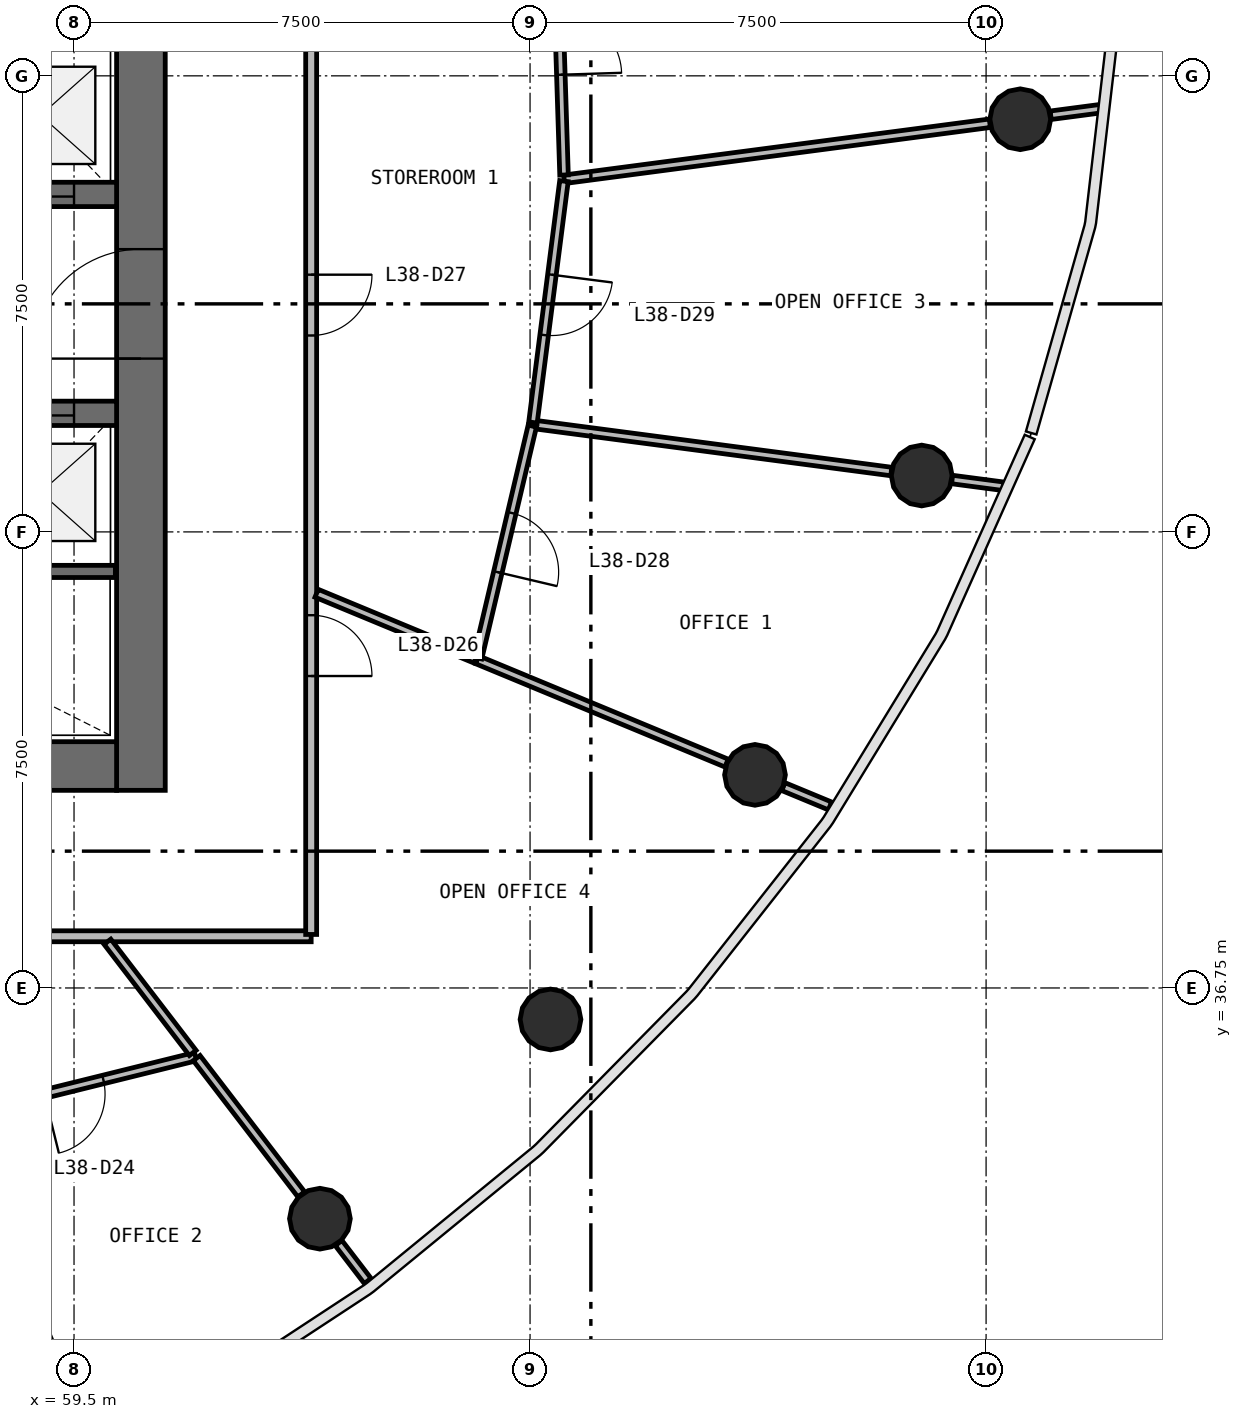
"""IFC4 building model, lengths in metres.
Left out: names, types, materials, properties, quantities, classifications, styles, units other than length and angle.
Written with IfcOpenShell. Run it as: python <this file> out.ifc"""

import sys

from ifc_helpers import new_model, si_unit, direction, frame, frame_2d, origin, origin_2d, place, context, subcontext, project, spatial, rectangle, circle, extrude, source, transform, mapped, element, fill, save


model = new_model("IFC4")
c1 = context("Model", 3, precision=1e-05, world=origin(), true_north=direction((0.0, 1.0)))
c2 = subcontext(c1, "Body", "Model", "MODEL_VIEW")
j1 = project(units=[si_unit("LENGTHUNIT", "METRE"), si_unit("PLANEANGLEUNIT", "RADIAN")], contexts=[c1])
p1 = place(None, origin())
s1 = spatial("IfcSite", under=j1, at=p1, CompositionType="ELEMENT")
p2 = place(p1, origin())
s2 = spatial("IfcBuilding", under=s1, at=p2, CompositionType="ELEMENT")
p3 = place(p2, frame((0.0, 0.0, 160.4)))
s3 = spatial("IfcBuildingStorey", under=s2, at=p3, CompositionType="ELEMENT", Elevation=160.4)
p4 = place(p3, frame((60.6, 40.0, 0.0), z_axis=(0.0, 0.0, 1.0), x_axis=(0.0, 1.0, 0.0)))
e1 = element("IfcWall", 1, at=p4, inside=s3, PredefinedType="SHEAR", context=c2, shape_type="SweptSolid", body=[
    extrude(rectangle(XDim=16.0, YDim=0.8, at=frame_2d((8.0, 0.0))), origin(), (0.0, 0.0, 1.0), 3.9),
])
p5 = place(p4, frame((7.1, 0.0, 0.0)))
e2 = element("IfcOpeningElement", 2, at=p5, cuts=e1, PredefinedType="OPENING", context=c2, shape_type="SweptSolid", body=[
    extrude(rectangle(XDim=1.8, YDim=2.1, at=frame_2d((0.9, 1.05))), frame((0.0, 0.41, 0.0), z_axis=(0.0, -1.0, 0.0), x_axis=(1.0, 0.0, 0.0)), (0.0, 0.0, 1.0), 0.82),
])
p6 = place(p3, frame((43.8, 40.4, 0.0), z_axis=(0.0, 0.0, 1.0), x_axis=(1.0, 0.0, 0.0)))
e3 = element("IfcWall", 3, at=p6, inside=s3, PredefinedType="SHEAR", context=c2, shape_type="SweptSolid", body=[
    extrude(rectangle(XDim=16.4, YDim=0.8, at=frame_2d((8.2, 0.0))), origin(), (0.0, 0.0, 1.0), 3.9),
])
p7 = place(p6, frame((10.1, 0.0, 0.0)))
e4 = element("IfcOpeningElement", 4, at=p7, cuts=e3, PredefinedType="OPENING", context=c2, shape_type="SweptSolid", body=[
    extrude(rectangle(XDim=1.2, YDim=2.1, at=frame_2d((0.6, 1.05))), frame((0.0, 0.41, 0.0), z_axis=(0.0, -1.0, 0.0), x_axis=(1.0, 0.0, 0.0)), (0.0, 0.0, 1.0), 0.82),
])
p8 = place(p6, frame((7.05, 0.0, 0.0)))
e5 = element("IfcOpeningElement", 5, at=p8, cuts=e3, PredefinedType="OPENING", context=c2, shape_type="SweptSolid", body=[
    extrude(rectangle(XDim=1.1, YDim=2.1, at=frame_2d((0.55, 1.05))), frame((0.0, 0.41, 0.0), z_axis=(0.0, -1.0, 0.0), x_axis=(1.0, 0.0, 0.0)), (0.0, 0.0, 1.0), 0.82),
])
p9 = place(p6, frame((0.5, 0.0, 0.0)))
e6 = element("IfcOpeningElement", 6, at=p9, cuts=e3, PredefinedType="OPENING", context=c2, shape_type="SweptSolid", body=[
    extrude(rectangle(XDim=0.8, YDim=2.1, at=frame_2d((0.4, 1.05))), frame((0.0, 0.41, 0.0), z_axis=(0.0, -1.0, 0.0), x_axis=(1.0, 0.0, 0.0)), (0.0, 0.0, 1.0), 0.82),
])
p10 = place(p3, frame((43.8, 49.8, 0.0), z_axis=(0.0, 0.0, 1.0), x_axis=(1.0, 0.0, 0.0)))
e7 = element("IfcWall", 7, at=p10, inside=s3, PredefinedType="SHEAR", context=c2, shape_type="SweptSolid", body=[
    extrude(rectangle(XDim=16.4, YDim=0.4, at=frame_2d((8.2, 0.0))), origin(), (0.0, 0.0, 1.0), 3.9),
])
p11 = place(p10, frame((9.6, 0.0, 0.0)))
e8 = element("IfcOpeningElement", 8, at=p11, cuts=e7, PredefinedType="OPENING", context=c2, shape_type="SweptSolid", body=[
    extrude(rectangle(XDim=1.1, YDim=2.1, at=frame_2d((0.55, 1.05))), frame((0.0, 0.21, 0.0), z_axis=(0.0, -1.0, 0.0), x_axis=(1.0, 0.0, 0.0)), (0.0, 0.0, 1.0), 0.42),
])
p12 = place(p10, frame((12.1, 0.0, 0.0)))
e9 = element("IfcOpeningElement", 9, at=p12, cuts=e7, PredefinedType="OPENING", context=c2, shape_type="SweptSolid", body=[
    extrude(rectangle(XDim=1.1, YDim=2.1, at=frame_2d((0.55, 1.05))), frame((0.0, 0.21, 0.0), z_axis=(0.0, -1.0, 0.0), x_axis=(1.0, 0.0, 0.0)), (0.0, 0.0, 1.0), 0.42),
])
p13 = place(p10, frame((14.6, 0.0, 0.0)))
e10 = element("IfcOpeningElement", 10, at=p13, cuts=e7, PredefinedType="OPENING", context=c2, shape_type="SweptSolid", body=[
    extrude(rectangle(XDim=1.1, YDim=2.1, at=frame_2d((0.55, 1.05))), frame((0.0, 0.21, 0.0), z_axis=(0.0, -1.0, 0.0), x_axis=(1.0, 0.0, 0.0)), (0.0, 0.0, 1.0), 0.42),
])
p14 = place(p10, frame((3.45, 0.0, 0.0)))
e11 = element("IfcOpeningElement", 11, at=p14, cuts=e7, PredefinedType="OPENING", context=c2, shape_type="SweptSolid", body=[
    extrude(rectangle(XDim=0.9, YDim=2.1, at=frame_2d((0.45, 1.05))), frame((0.0, 0.21, 0.0), z_axis=(0.0, -1.0, 0.0), x_axis=(1.0, 0.0, 0.0)), (0.0, 0.0, 1.0), 0.42),
])
p15 = place(p10, frame((7.65, 0.0, 0.0)))
e12 = element("IfcOpeningElement", 12, at=p15, cuts=e7, PredefinedType="OPENING", context=c2, shape_type="SweptSolid", body=[
    extrude(rectangle(XDim=0.9, YDim=2.1, at=frame_2d((0.45, 1.05))), frame((0.0, 0.21, 0.0), z_axis=(0.0, -1.0, 0.0), x_axis=(1.0, 0.0, 0.0)), (0.0, 0.0, 1.0), 0.42),
])
p16 = place(p3, frame((43.8, 46.2, 0.0), z_axis=(0.0, 0.0, 1.0), x_axis=(1.0, 0.0, 0.0)))
e13 = element("IfcWall", 13, at=p16, inside=s3, PredefinedType="SHEAR", context=c2, shape_type="SweptSolid", body=[
    extrude(rectangle(XDim=16.4, YDim=0.4, at=frame_2d((8.2, 0.0))), origin(), (0.0, 0.0, 1.0), 3.9),
])
p17 = place(p16, frame((9.6, 0.0, 0.0)))
e14 = element("IfcOpeningElement", 14, at=p17, cuts=e13, PredefinedType="OPENING", context=c2, shape_type="SweptSolid", body=[
    extrude(rectangle(XDim=1.1, YDim=2.1, at=frame_2d((0.55, 1.05))), frame((0.0, 0.21, 0.0), z_axis=(0.0, -1.0, 0.0), x_axis=(1.0, 0.0, 0.0)), (0.0, 0.0, 1.0), 0.42),
])
p18 = place(p16, frame((12.1, 0.0, 0.0)))
e15 = element("IfcOpeningElement", 15, at=p18, cuts=e13, PredefinedType="OPENING", context=c2, shape_type="SweptSolid", body=[
    extrude(rectangle(XDim=1.1, YDim=2.1, at=frame_2d((0.55, 1.05))), frame((0.0, 0.21, 0.0), z_axis=(0.0, -1.0, 0.0), x_axis=(1.0, 0.0, 0.0)), (0.0, 0.0, 1.0), 0.42),
])
p19 = place(p16, frame((14.6, 0.0, 0.0)))
e16 = element("IfcOpeningElement", 16, at=p19, cuts=e13, PredefinedType="OPENING", context=c2, shape_type="SweptSolid", body=[
    extrude(rectangle(XDim=1.1, YDim=2.1, at=frame_2d((0.55, 1.05))), frame((0.0, 0.21, 0.0), z_axis=(0.0, -1.0, 0.0), x_axis=(1.0, 0.0, 0.0)), (0.0, 0.0, 1.0), 0.42),
])
p20 = place(p16, frame((2.45, 0.0, 0.0)))
e17 = element("IfcOpeningElement", 17, at=p20, cuts=e13, PredefinedType="OPENING", context=c2, shape_type="SweptSolid", body=[
    extrude(rectangle(XDim=0.9, YDim=2.1, at=frame_2d((0.45, 1.05))), frame((0.0, 0.21, 0.0), z_axis=(0.0, -1.0, 0.0), x_axis=(1.0, 0.0, 0.0)), (0.0, 0.0, 1.0), 0.42),
])
p21 = place(p16, frame((7.65, 0.0, 0.0)))
e18 = element("IfcOpeningElement", 18, at=p21, cuts=e13, PredefinedType="OPENING", context=c2, shape_type="SweptSolid", body=[
    extrude(rectangle(XDim=0.9, YDim=2.1, at=frame_2d((0.45, 1.05))), frame((0.0, 0.21, 0.0), z_axis=(0.0, -1.0, 0.0), x_axis=(1.0, 0.0, 0.0)), (0.0, 0.0, 1.0), 0.42),
])
m1 = source(origin(), c2, "Body", "SweptSolid", [
    extrude(circle(Radius=0.5, at=origin_2d()), origin(), (0.0, 0.0, 1.0), 3.9),
])
for number, where, z_axis, x_axis in (
    (19, (75.062, 51.036, 0.0), (0.0, 0.0, 1.0), (1.0, 0.0, 0.0)),
    (20, (63.544, 32.956, 0.0), (0.0, 0.0, 1.0), (1.0, 0.0, 0.0)),
    (21, (67.336, 36.232, 0.0), (0.0, 0.0, 1.0), (1.0, 0.0, 0.0)),
    (22, (70.699, 40.254, 0.0), (0.0, 0.0, 1.0), (1.0, 0.0, 0.0)),
    (23, (73.441, 45.177, 0.0), (0.0, 0.0, 1.0), (1.0, 0.0, 0.0)),
):
    element("IfcColumn", number, at=place(p3, frame(where, z_axis=z_axis, x_axis=x_axis)), inside=s3, PredefinedType="COLUMN", context=c2, shape_type="MappedRepresentation", body=[
        mapped(m1, transform((0.0, 0.0, 0.0), scale=1.0)),
    ])
p22 = place(p3, frame((57.73, 43.6, 0.0), z_axis=(0.0, 0.0, 1.0), x_axis=(1.0, 0.0, 0.0)))
e24 = element("IfcWall", 24, at=p22, inside=s3, PredefinedType="SOLIDWALL", context=c2, shape_type="SweptSolid", body=[
    extrude(rectangle(XDim=2.45, YDim=0.2, at=frame_2d((1.225, 0.0))), origin(), (0.0, 0.0, 1.0), 3.58),
])
p23 = place(p3, frame((63.4, 37.6, 0.0), z_axis=(0.0, 0.0, 1.0), x_axis=(-1.0, 0.0, 0.0)))
e25 = element("IfcWall", 25, at=p23, inside=s3, PredefinedType="PARTITIONING", context=c2, shape_type="SweptSolid", body=[
    extrude(rectangle(XDim=22.8, YDim=0.18, at=frame_2d((11.4, 0.0))), origin(), (0.0, 0.0, 1.0), 2.88),
])
p24 = place(p23, frame((16.05, 0.0, 0.0)))
e26 = element("IfcOpeningElement", 26, at=p24, cuts=e25, PredefinedType="OPENING", context=c2, shape_type="SweptSolid", body=[
    extrude(rectangle(XDim=0.9, YDim=2.1, at=frame_2d((0.45, 1.05))), frame((0.0, 0.1, 0.0), z_axis=(0.0, -1.0, 0.0), x_axis=(1.0, 0.0, 0.0)), (0.0, 0.0, 1.0), 0.2),
])
p25 = place(p23, frame((13.05, 0.0, 0.0)))
e27 = element("IfcOpeningElement", 27, at=p25, cuts=e25, PredefinedType="OPENING", context=c2, shape_type="SweptSolid", body=[
    extrude(rectangle(XDim=0.9, YDim=2.1, at=frame_2d((0.45, 1.05))), frame((0.0, 0.1, 0.0), z_axis=(0.0, -1.0, 0.0), x_axis=(1.0, 0.0, 0.0)), (0.0, 0.0, 1.0), 0.2),
])
p26 = place(p23, frame((10.95, 0.0, 0.0)))
e28 = element("IfcOpeningElement", 28, at=p26, cuts=e25, PredefinedType="OPENING", context=c2, shape_type="SweptSolid", body=[
    extrude(rectangle(XDim=1.0, YDim=2.1, at=frame_2d((0.5, 1.05))), frame((0.0, 0.1, 0.0), z_axis=(0.0, -1.0, 0.0), x_axis=(1.0, 0.0, 0.0)), (0.0, 0.0, 1.0), 0.2),
])
p27 = place(p23, frame((19.95, 0.0, 0.0)))
e29 = element("IfcOpeningElement", 29, at=p27, cuts=e25, PredefinedType="OPENING", context=c2, shape_type="SweptSolid", body=[
    extrude(rectangle(XDim=1.0, YDim=2.1, at=frame_2d((0.5, 1.05))), frame((0.0, 0.1, 0.0), z_axis=(0.0, -1.0, 0.0), x_axis=(1.0, 0.0, 0.0)), (0.0, 0.0, 1.0), 0.2),
])
p28 = place(p3, frame((63.4, 58.37, 0.0), z_axis=(0.0, 0.0, 1.0), x_axis=(0.0, -1.0, 0.0)))
e30 = element("IfcWall", 30, at=p28, inside=s3, PredefinedType="PARTITIONING", context=c2, shape_type="SweptSolid", body=[
    extrude(rectangle(XDim=20.74, YDim=0.18, at=frame_2d((10.37, 0.0))), origin(), (0.0, 0.0, 1.0), 2.88),
])
p29 = place(p28, frame((15.49, 0.0, 0.0)))
e31 = element("IfcOpeningElement", 31, at=p29, cuts=e30, PredefinedType="OPENING", context=c2, shape_type="SweptSolid", body=[
    extrude(rectangle(XDim=1.0, YDim=2.1, at=frame_2d((0.5, 1.05))), frame((0.0, 0.1, 0.0), z_axis=(0.0, -1.0, 0.0), x_axis=(1.0, 0.0, 0.0)), (0.0, 0.0, 1.0), 0.2),
])
p30 = place(p28, frame((9.89, 0.0, 0.0)))
e32 = element("IfcOpeningElement", 32, at=p30, cuts=e30, PredefinedType="OPENING", context=c2, shape_type="SweptSolid", body=[
    extrude(rectangle(XDim=1.0, YDim=2.1, at=frame_2d((0.5, 1.05))), frame((0.0, 0.1, 0.0), z_axis=(0.0, -1.0, 0.0), x_axis=(1.0, 0.0, 0.0)), (0.0, 0.0, 1.0), 0.2),
])
p31 = place(p3, frame((67.561, 50.049, 0.0), z_axis=(0.0, 0.0, 1.0), x_axis=(0.991446056041, 0.130517117504, 0.0)))
e33 = element("IfcWall", 33, at=p31, inside=s3, PredefinedType="PARTITIONING", context=c2, shape_type="SweptSolid", body=[
    extrude(rectangle(XDim=7.061, YDim=0.14, at=frame_2d((3.531, 0.0))), origin(), (0.0, 0.0, 1.0), 2.88),
])
p32 = place(p3, frame((67.044, 46.019, 0.0), z_axis=(0.0, 0.0, 1.0), x_axis=(0.991450523091, -0.13048318, 0.0)))
e34 = element("IfcWall", 34, at=p32, inside=s3, PredefinedType="PARTITIONING", context=c2, shape_type="SweptSolid", body=[
    extrude(rectangle(XDim=5.948, YDim=0.14, at=frame_2d((2.974, 0.0))), origin(), (0.0, 0.0, 1.0), 2.88),
])
p33 = place(p3, frame((66.131, 42.147, 0.0), z_axis=(0.0, 0.0, 1.0), x_axis=(0.923872072557, -0.382701441792, 0.0)))
e35 = element("IfcWall", 35, at=p33, inside=s3, PredefinedType="PARTITIONING", context=c2, shape_type="SweptSolid", body=[
    extrude(rectangle(XDim=4.44, YDim=0.14, at=frame_2d((2.22, 0.0))), origin(), (0.0, 0.0, 1.0), 2.88),
])
p34 = place(p3, frame((67.424, 54.358, 0.0), z_axis=(0.0, 0.0, 1.0), x_axis=(0.031887030208, -0.999491479356, 0.0)))
e36 = element("IfcWall", 36, at=p34, inside=s3, PredefinedType="PARTITIONING", context=c2, shape_type="SweptSolid", body=[
    extrude(rectangle(XDim=4.242, YDim=0.14, at=frame_2d((2.121, 0.0))), origin(), (0.0, 0.0, 1.0), 2.88),
])
p35 = place(p34, frame((1.592, 0.0, 0.0)))
e37 = element("IfcOpeningElement", 37, at=p35, cuts=e36, PredefinedType="OPENING", context=c2, shape_type="SweptSolid", body=[
    extrude(rectangle(XDim=1.0, YDim=2.1, at=frame_2d((0.5, 1.05))), frame((0.0, 0.08, 0.0), z_axis=(0.0, -1.0, 0.0), x_axis=(1.0, 0.0, 0.0)), (0.0, 0.0, 1.0), 0.16),
])
p36 = place(p3, frame((57.534, 34.639, 0.0), z_axis=(0.0, 0.0, 1.0), x_axis=(0.382696163026, -0.923874259196, 0.0)))
e38 = element("IfcWall", 38, at=p36, inside=s3, PredefinedType="PARTITIONING", context=c2, shape_type="SweptSolid", body=[
    extrude(rectangle(XDim=4.112, YDim=0.14, at=frame_2d((2.056, 0.0))), origin(), (0.0, 0.0, 1.0), 2.88),
])
p37 = place(p3, frame((61.499, 35.621, 0.0), z_axis=(0.0, 0.0, 1.0), x_axis=(-0.970705214058, -0.240273567836, 0.0)))
e39 = element("IfcWall", 39, at=p37, inside=s3, PredefinedType="PARTITIONING", context=c2, shape_type="SweptSolid", body=[
    extrude(rectangle(XDim=4.014, YDim=0.14, at=frame_2d((2.007, 0.0))), origin(), (0.0, 0.0, 1.0), 2.88),
])
p38 = place(p37, frame((1.563, 0.0, 0.0)))
e40 = element("IfcOpeningElement", 40, at=p38, cuts=e39, PredefinedType="OPENING", context=c2, shape_type="SweptSolid", body=[
    extrude(rectangle(XDim=1.0, YDim=2.1, at=frame_2d((0.5, 1.05))), frame((0.0, 0.08, 0.0), z_axis=(0.0, -1.0, 0.0), x_axis=(1.0, 0.0, 0.0)), (0.0, 0.0, 1.0), 0.16),
])
p39 = place(p3, frame((67.557, 50.019, 0.0), z_axis=(0.0, 0.0, 1.0), x_axis=(-0.127375141881, -0.99185461295, 0.0)))
e41 = element("IfcWall", 41, at=p39, inside=s3, PredefinedType="PARTITIONING", context=c2, shape_type="SweptSolid", body=[
    extrude(rectangle(XDim=4.002, YDim=0.14, at=frame_2d((2.001, 0.0))), origin(), (0.0, 0.0, 1.0), 2.88),
])
p40 = place(p39, frame((1.552, 0.0, 0.0)))
e42 = element("IfcOpeningElement", 42, at=p40, cuts=e41, PredefinedType="OPENING", context=c2, shape_type="SweptSolid", body=[
    extrude(rectangle(XDim=1.0, YDim=2.1, at=frame_2d((0.5, 1.05))), frame((0.0, 0.08, 0.0), z_axis=(0.0, -1.0, 0.0), x_axis=(1.0, 0.0, 0.0)), (0.0, 0.0, 1.0), 0.16),
])
p41 = place(p3, frame((67.037, 45.99, 0.0), z_axis=(0.0, 0.0, 1.0), x_axis=(-0.229452538662, -0.973319851077, 0.0)))
e43 = element("IfcWall", 43, at=p41, inside=s3, PredefinedType="PARTITIONING", context=c2, shape_type="SweptSolid", body=[
    extrude(rectangle(XDim=3.919, YDim=0.14, at=frame_2d((1.959, 0.0))), origin(), (0.0, 0.0, 1.0), 2.88),
])
p42 = place(p41, frame((1.469, 0.0, 0.0)))
e44 = element("IfcOpeningElement", 44, at=p42, cuts=e43, PredefinedType="OPENING", context=c2, shape_type="SweptSolid", body=[
    extrude(rectangle(XDim=1.0, YDim=2.1, at=frame_2d((0.5, 1.05))), frame((0.0, 0.08, 0.0), z_axis=(0.0, -1.0, 0.0), x_axis=(1.0, 0.0, 0.0)), (0.0, 0.0, 1.0), 0.16),
])
p43 = place(p3, frame((63.49, 43.241, 0.0), z_axis=(0.0, 0.0, 1.0), x_axis=(0.923859015747, -0.382732960462, 0.0)))
e45 = element("IfcWall", 45, at=p43, inside=s3, PredefinedType="PARTITIONING", context=c2, shape_type="SweptSolid", body=[
    extrude(rectangle(XDim=2.828, YDim=0.14, at=frame_2d((1.414, 0.0))), origin(), (0.0, 0.0, 1.0), 2.88),
])
p44 = place(p3, frame((61.517, 35.597, 0.0), z_axis=(0.0, 0.0, 1.0), x_axis=(0.608716333524, -0.793387941238, 0.0)))
e46 = element("IfcWall", 46, at=p44, inside=s3, PredefinedType="PARTITIONING", context=c2, shape_type="SweptSolid", body=[
    extrude(rectangle(XDim=2.825, YDim=0.14, at=frame_2d((1.413, 0.0))), origin(), (0.0, 0.0, 1.0), 2.88),
])
p45 = place(p3, frame((60.049, 37.51, 0.0), z_axis=(0.0, 0.0, 1.0), x_axis=(0.608742818772, -0.793367620081, 0.0)))
e47 = element("IfcWall", 47, at=p45, inside=s3, PredefinedType="PARTITIONING", context=c2, shape_type="SweptSolid", body=[
    extrude(rectangle(XDim=2.305, YDim=0.14, at=frame_2d((1.152, 0.0))), origin(), (0.0, 0.0, 1.0), 2.88),
])
p46 = place(p3, frame((73.941, 45.111, 0.0), z_axis=(0.0, 0.0, 1.0), x_axis=(0.991446500326, -0.130513742537, 0.0)))
e48 = element("IfcWall", 48, at=p46, inside=s3, PredefinedType="PARTITIONING", context=c2, shape_type="SweptSolid", body=[
    extrude(rectangle(XDim=0.853, YDim=0.14, at=frame_2d((0.427, 0.0))), origin(), (0.0, 0.0, 1.0), 2.88),
])
p47 = place(p3, frame((75.562, 51.102, 0.0), z_axis=(0.0, 0.0, 1.0), x_axis=(0.991432738393, 0.130618242377, 0.0)))
e49 = element("IfcWall", 49, at=p47, inside=s3, PredefinedType="PARTITIONING", context=c2, shape_type="SweptSolid", body=[
    extrude(rectangle(XDim=0.849, YDim=0.14, at=frame_2d((0.424, 0.0))), origin(), (0.0, 0.0, 1.0), 2.88),
])
p48 = place(p3, frame((71.166, 40.061, 0.0), z_axis=(0.0, 0.0, 1.0), x_axis=(0.923909393783, -0.382611332921, 0.0)))
e50 = element("IfcWall", 50, at=p48, inside=s3, PredefinedType="PARTITIONING", context=c2, shape_type="SweptSolid", body=[
    extrude(rectangle(XDim=0.831, YDim=0.14, at=frame_2d((0.416, 0.0))), origin(), (0.0, 0.0, 1.0), 2.88),
])
p49 = place(p3, frame((63.851, 32.555, 0.0), z_axis=(0.0, 0.0, 1.0), x_axis=(0.608659697441, -0.793431391307, 0.0)))
e51 = element("IfcWall", 51, at=p49, inside=s3, PredefinedType="PARTITIONING", context=c2, shape_type="SweptSolid", body=[
    extrude(rectangle(XDim=0.786, YDim=0.14, at=frame_2d((0.393, 0.0))), origin(), (0.0, 0.0, 1.0), 2.88),
])
m2 = source(origin(), c2, "Body", "SweptSolid", [
    extrude(rectangle(XDim=1.8, YDim=2.1, at=frame_2d((0.9, 1.05))), frame((0.0, 0.025, 0.0), z_axis=(0.0, -1.0, 0.0), x_axis=(1.0, 0.0, 0.0)), (0.0, 0.0, 1.0), 0.05),
])
p50 = place(p5, origin())
e52 = element("IfcDoor", 52, at=p50, inside=s3, OperationType="SINGLE_SWING_LEFT", PredefinedType="DOOR", context=c2, shape_type="MappedRepresentation", body=[
    mapped(m2, transform((0.0, 0.0, 0.0), scale=1.0)),
])
fill(e2, e52)
m3 = source(origin(), c2, "Body", "SweptSolid", [
    extrude(rectangle(XDim=1.1, YDim=2.1, at=frame_2d((0.55, 1.05))), frame((0.0, 0.025, 0.0), z_axis=(0.0, -1.0, 0.0), x_axis=(1.0, 0.0, 0.0)), (0.0, 0.0, 1.0), 0.05),
])
p51 = place(p13, origin())
e53 = element("IfcDoor", 53, at=p51, inside=s3, OperationType="DOUBLE_DOOR_SLIDING", PredefinedType="USERDEFINED", context=c2, shape_type="MappedRepresentation", body=[
    mapped(m3, transform((0.0, 0.0, 0.0), scale=1.0)),
])
fill(e10, e53)
p52 = place(p19, origin())
e54 = element("IfcDoor", 54, at=p52, inside=s3, OperationType="DOUBLE_DOOR_SLIDING", PredefinedType="USERDEFINED", context=c2, shape_type="MappedRepresentation", body=[
    mapped(m3, transform((0.0, 0.0, 0.0), scale=1.0)),
])
fill(e16, e54)
m4 = source(origin(), c2, "Body", "SweptSolid", [
    extrude(rectangle(XDim=1.0, YDim=2.1, at=frame_2d((0.5, 1.05))), frame((0.0, 0.025, 0.0), z_axis=(0.0, -1.0, 0.0), x_axis=(1.0, 0.0, 0.0)), (0.0, 0.0, 1.0), 0.05),
])
p53 = place(p38, origin())
e55 = element("IfcDoor", 55, at=p53, inside=s3, OperationType="SINGLE_SWING_RIGHT", PredefinedType="DOOR", context=c2, shape_type="MappedRepresentation", body=[
    mapped(m4, transform((0.0, 0.0, 0.0), scale=1.0)),
])
fill(e40, e55)
p54 = place(p29, origin())
e56 = element("IfcDoor", 56, at=p54, inside=s3, OperationType="SINGLE_SWING_RIGHT", PredefinedType="DOOR", context=c2, shape_type="MappedRepresentation", body=[
    mapped(m4, transform((0.0, 0.0, 0.0), scale=1.0)),
])
fill(e31, e56)
p55 = place(p30, origin())
e57 = element("IfcDoor", 57, at=p55, inside=s3, OperationType="SINGLE_SWING_LEFT", PredefinedType="DOOR", context=c2, shape_type="MappedRepresentation", body=[
    mapped(m4, transform((0.0, 0.0, 0.0), scale=1.0)),
])
fill(e32, e57)
p56 = place(p42, origin())
e58 = element("IfcDoor", 58, at=p56, inside=s3, OperationType="SINGLE_SWING_RIGHT", PredefinedType="DOOR", context=c2, shape_type="MappedRepresentation", body=[
    mapped(m4, transform((0.0, 0.0, 0.0), scale=1.0)),
])
fill(e44, e58)
p57 = place(p40, origin())
e59 = element("IfcDoor", 59, at=p57, inside=s3, OperationType="SINGLE_SWING_LEFT", PredefinedType="DOOR", context=c2, shape_type="MappedRepresentation", body=[
    mapped(m4, transform((0.0, 0.0, 0.0), scale=1.0)),
])
fill(e42, e59)
p58 = place(p35, origin())
e60 = element("IfcDoor", 60, at=p58, inside=s3, OperationType="SINGLE_SWING_RIGHT", PredefinedType="DOOR", context=c2, shape_type="MappedRepresentation", body=[
    mapped(m4, transform((0.0, 0.0, 0.0), scale=1.0)),
])
fill(e37, e60)
save(model, sys.argv[1])
